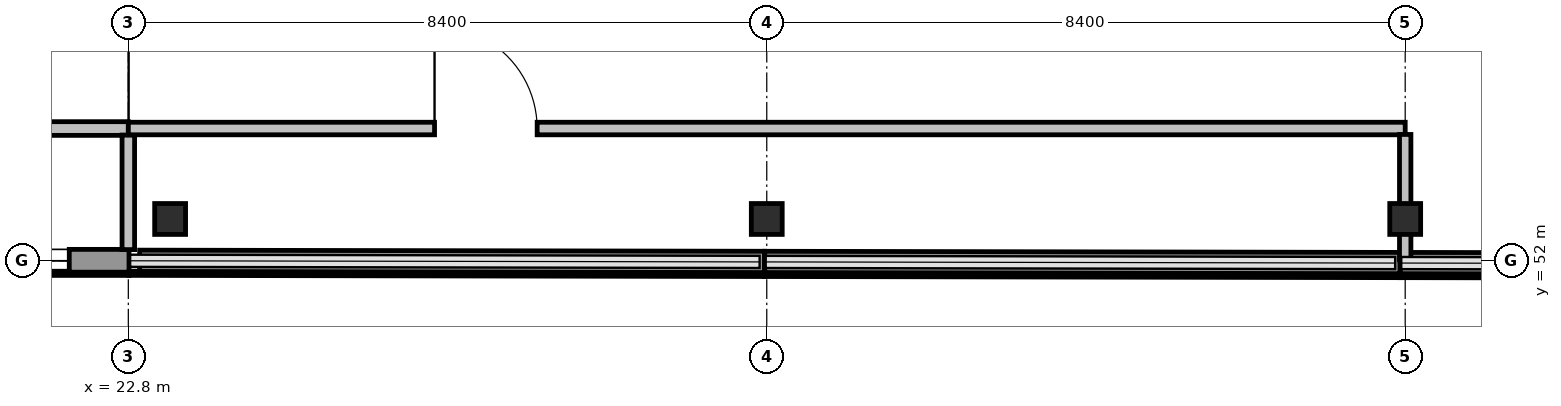
"""IFC4 building model, lengths in metres.
Left out: names, types, materials, properties, quantities, classifications, styles, units other than length and angle.
Written with IfcOpenShell. Run it as: python <this file> out.ifc"""

import sys

from ifc_helpers import new_model, si_unit, direction, frame, frame_2d, origin, origin_2d, place, context, subcontext, project, spatial, rectangle, hollow_circle, extrude, element, fill, save


model = new_model("IFC4")
c1 = context("Model", 3, precision=1e-05, world=origin(), true_north=direction((0.0, 1.0)))
c2 = subcontext(c1, "Body", "Model", "MODEL_VIEW")
j1 = project(units=[si_unit("LENGTHUNIT", "METRE"), si_unit("PLANEANGLEUNIT", "RADIAN")], contexts=[c1])
p1 = place(None, origin())
s1 = spatial("IfcSite", under=j1, at=p1, CompositionType="ELEMENT")
p2 = place(p1, origin())
s2 = spatial("IfcBuilding", under=s1, at=p2, CompositionType="ELEMENT")
p3 = place(p2, frame((0.0, 0.0, 10.2)))
s3 = spatial("IfcBuildingStorey", under=s2, at=p3, CompositionType="ELEMENT", Elevation=10.2)
for number, where, z_axis, x_axis in (
    (1, (23.35, 52.55, 0.0), (0.0, 0.0, 1.0), (1.0, 0.0, 0.0)),
    (2, (31.2, 52.55, 0.0), (0.0, 0.0, 1.0), (1.0, 0.0, 0.0)),
    (3, (39.6, 52.55, 0.0), (0.0, 0.0, 1.0), (1.0, 0.0, 0.0)),
):
    element("IfcColumn", number, at=place(p3, frame(where, z_axis=z_axis, x_axis=x_axis)), inside=s3, PredefinedType="COLUMN", context=c2, shape_type="SweptSolid", body=[
        extrude(hollow_circle(Radius=0.203, WallThickness=0.016, at=origin_2d()), origin(), (0.0, 0.0, 1.0), 4.555),
    ])
p4 = place(p3, frame((47.893, 51.955, 0.0), z_axis=(0.0, 0.0, 1.0), x_axis=(-0.999998412594, 0.001781799421, 0.0)))
e4 = element("IfcWall", 4, at=p4, inside=s3, PredefinedType="SOLIDWALL", context=c2, shape_type="SweptSolid", body=[
    extrude(rectangle(XDim=8.358, YDim=0.28, at=frame_2d((4.179, 0.0))), origin(), (0.0, 0.0, 1.0), 0.94),
])
p5 = place(p3, frame((39.531, 51.97, 0.0), z_axis=(0.0, 0.0, 1.0), x_axis=(-0.999998360026, 0.001811062053, 0.0)))
e5 = element("IfcWall", 5, at=p5, inside=s3, PredefinedType="SOLIDWALL", context=c2, shape_type="SweptSolid", body=[
    extrude(rectangle(XDim=8.358, YDim=0.28, at=frame_2d((4.179, 0.0))), origin(), (0.0, 0.0, 1.0), 0.94),
])
p6 = place(p3, frame((31.169, 51.985, 0.0), z_axis=(0.0, 0.0, 1.0), x_axis=(-0.999998358775, 0.001811752647, 0.0)))
e6 = element("IfcWall", 6, at=p6, inside=s3, PredefinedType="SOLIDWALL", context=c2, shape_type="SweptSolid", body=[
    extrude(rectangle(XDim=8.22, YDim=0.28, at=frame_2d((4.11, 0.0))), origin(), (0.0, 0.0, 1.0), 0.94),
])
p7 = place(p3, frame((22.809, 52.0, 0.0), z_axis=(0.0, 0.0, 1.0), x_axis=(-1.0, 0.0, 0.0)))
e7 = element("IfcWall", 7, at=p7, inside=s3, PredefinedType="SOLIDWALL", context=c2, shape_type="SweptSolid", body=[
    extrude(rectangle(XDim=8.409, YDim=0.3, at=frame_2d((4.205, 0.0))), origin(), (0.0, 0.0, 1.0), 4.46),
])
p8 = place(p7, frame((0.786, 0.0, 0.96)))
e8 = element("IfcOpeningElement", 8, at=p8, cuts=e7, PredefinedType="OPENING", context=c2, shape_type="SweptSolid", body=[
    extrude(rectangle(XDim=2.8, YDim=1.65, at=frame_2d((1.4, 0.825))), frame((0.0, 0.16, 0.0), z_axis=(0.0, -1.0, 0.0), x_axis=(1.0, 0.0, 0.0)), (0.0, 0.0, 1.0), 0.32),
])
p9 = place(p3, frame((14.547, 53.74, 0.0), z_axis=(0.0, 0.0, 1.0), x_axis=(1.0, 0.0, 0.0)))
e9 = element("IfcWall", 9, at=p9, inside=s3, PredefinedType="PARTITIONING", context=c2, shape_type="SweptSolid", body=[
    extrude(rectangle(XDim=8.253, YDim=0.18, at=frame_2d((4.126, 0.0))), origin(), (0.0, 0.0, 1.0), 4.46),
])
p10 = place(p9, frame((3.301, 0.0, 0.0)))
e10 = element("IfcOpeningElement", 10, at=p10, cuts=e9, PredefinedType="OPENING", context=c2, shape_type="SweptSolid", body=[
    extrude(rectangle(XDim=1.65, YDim=2.2, at=frame_2d((0.825, 1.1))), frame((0.0, 0.1, 0.0), z_axis=(0.0, -1.0, 0.0), x_axis=(1.0, 0.0, 0.0)), (0.0, 0.0, 1.0), 0.2),
])
p11 = place(p3, frame((22.8, 53.654, 0.0), z_axis=(0.0, 0.0, 1.0), x_axis=(0.0, -1.0, 0.0)))
e11 = element("IfcWall", 11, at=p11, inside=s3, PredefinedType="PARTITIONING", context=c2, shape_type="SweptSolid", body=[
    extrude(rectangle(XDim=1.507, YDim=0.165, at=frame_2d((0.753, 0.0))), origin(), (0.0, 0.0, 1.0), 4.46),
])
p12 = place(p3, frame((22.8, 53.74, 0.0), z_axis=(0.0, 0.0, 1.0), x_axis=(1.0, 0.0, 0.0)))
e12 = element("IfcWall", 12, at=p12, inside=s3, PredefinedType="PARTITIONING", context=c2, shape_type="SweptSolid", body=[
    extrude(rectangle(XDim=16.8, YDim=0.165, at=frame_2d((8.4, 0.0))), origin(), (0.0, 0.0, 1.0), 4.46),
])
p13 = place(p12, frame((4.029, 0.0, 0.0)))
e13 = element("IfcOpeningElement", 13, at=p13, cuts=e12, PredefinedType="OPENING", context=c2, shape_type="SweptSolid", body=[
    extrude(rectangle(XDim=1.35, YDim=2.15, at=frame_2d((0.675, 1.075))), frame((0.0, 0.093, 0.0), z_axis=(0.0, -1.0, 0.0), x_axis=(1.0, 0.0, 0.0)), (0.0, 0.0, 1.0), 0.185),
])
p14 = place(p3, frame((39.6, 53.662, 0.0), z_axis=(0.0, 0.0, 1.0), x_axis=(0.0, -1.0, 0.0)))
e14 = element("IfcWall", 14, at=p14, inside=s3, PredefinedType="PARTITIONING", context=c2, shape_type="SweptSolid", body=[
    extrude(rectangle(XDim=1.65, YDim=0.15, at=frame_2d((0.825, 0.0))), origin(), (0.0, 0.0, 1.0), 3.665),
])
p15 = place(p8, origin())
e15 = element("IfcWindow", 15, at=p15, inside=s3, PartitioningType="SINGLE_PANEL", PredefinedType="WINDOW", context=c2, shape_type="SweptSolid", body=[
    extrude(rectangle(XDim=2.8, YDim=1.65, at=frame_2d((1.4, 0.825))), frame((0.0, 0.03, 0.0), z_axis=(0.0, -1.0, 0.0), x_axis=(1.0, 0.0, 0.0)), (0.0, 0.0, 1.0), 0.06),
])
fill(e8, e15)
p16 = place(p13, origin())
e16 = element("IfcDoor", 16, at=p16, inside=s3, OperationType="SINGLE_SWING_RIGHT", PredefinedType="DOOR", context=c2, shape_type="SweptSolid", body=[
    extrude(rectangle(XDim=1.35, YDim=2.15, at=frame_2d((0.675, 1.075))), frame((0.0, 0.025, 0.0), z_axis=(0.0, -1.0, 0.0), x_axis=(1.0, 0.0, 0.0)), (0.0, 0.0, 1.0), 0.05),
])
fill(e13, e16)
save(model, sys.argv[1])
